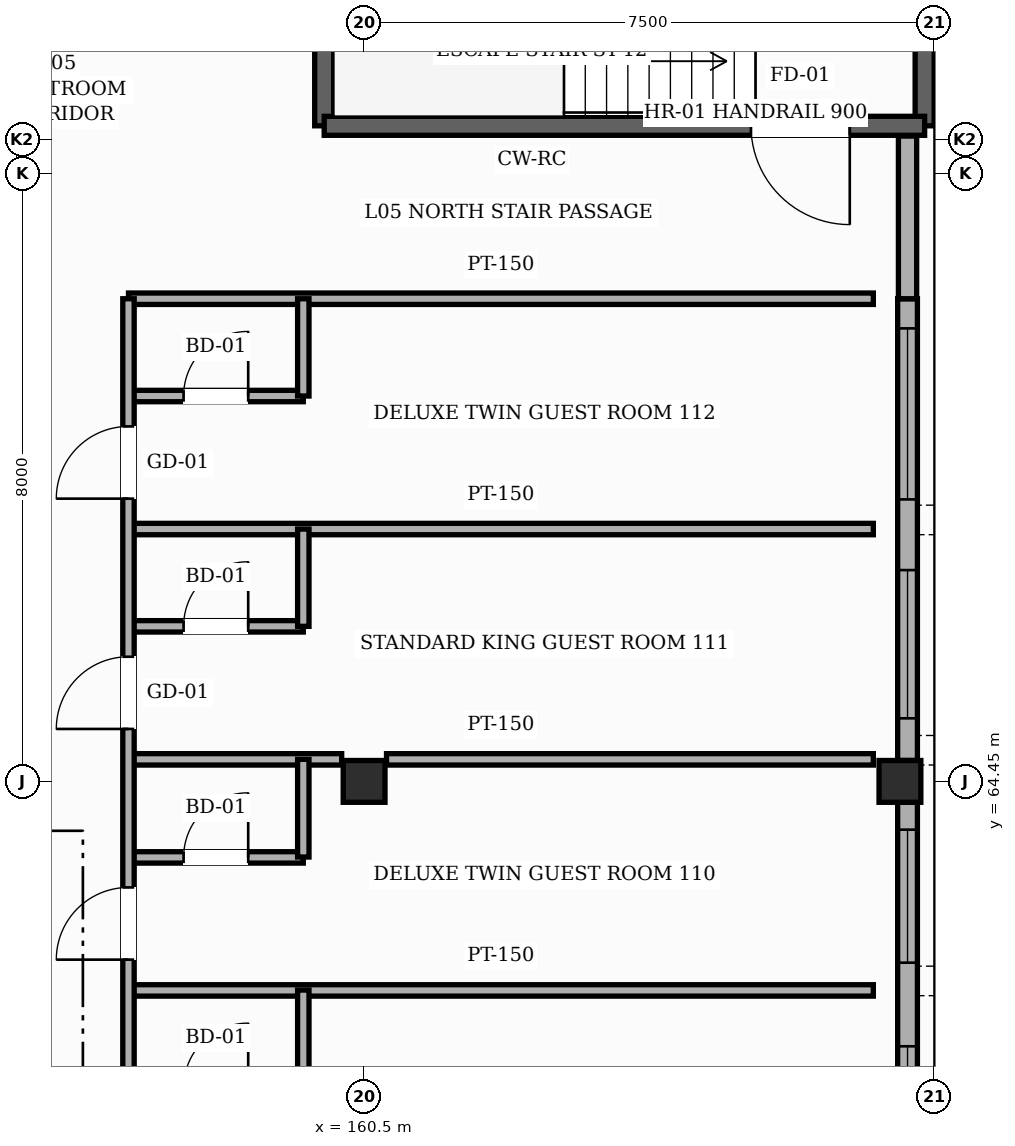
"""IFC4 building model, lengths in metres.
Left out: names, types, materials, properties, quantities, classifications, styles, units other than length and angle.
Written with IfcOpenShell. Run it as: python <this file> out.ifc"""

import sys

from ifc_helpers import new_model, si_unit, direction, frame, frame_2d, origin, origin_2d, place, context, subcontext, project, spatial, rectangle, hollow_rectangle, extrude, element, fill, save


model = new_model("IFC4")
c1 = context("Model", 3, precision=1e-05, world=origin(), true_north=direction((0.0, 1.0)))
c2 = subcontext(c1, "Body", "Model", "MODEL_VIEW")
j1 = project(units=[si_unit("LENGTHUNIT", "METRE"), si_unit("PLANEANGLEUNIT", "RADIAN")], contexts=[c1])
p1 = place(None, origin())
s1 = spatial("IfcSite", under=j1, at=p1, CompositionType="ELEMENT")
p2 = place(p1, origin())
s2 = spatial("IfcBuilding", under=s1, at=p2, CompositionType="ELEMENT")
p3 = place(p2, frame((0.0, 0.0, 24.6)))
s3 = spatial("IfcBuildingStorey", under=s2, at=p3, CompositionType="ELEMENT", Elevation=24.6)
for number, where, z_axis, x_axis in (
    (1, (160.5, 64.45, 0.0), (0.0, 0.0, 1.0), (1.0, 0.0, 0.0)),
    (2, (167.55, 64.45, 0.0), (0.0, 0.0, 1.0), (1.0, 0.0, 0.0)),
):
    element("IfcColumn", number, at=place(p3, frame(where, z_axis=z_axis, x_axis=x_axis)), inside=s3, PredefinedType="COLUMN", context=c2, shape_type="SweptSolid", body=[
        extrude(hollow_rectangle(XDim=0.55, YDim=0.55, WallThickness=0.022, InnerFilletRadius=0.022, OuterFilletRadius=0.044, at=origin_2d()), origin(), (0.0, 0.0, 1.0), 3.6),
    ])
p4 = place(p3, frame((167.65, 64.175, 0.0), z_axis=(0.0, 0.0, 1.0), x_axis=(0.0, -1.0, 0.0)))
e3 = element("IfcWall", 3, at=p4, inside=s3, PredefinedType="SOLIDWALL", context=c2, shape_type="SweptSolid", body=[
    extrude(rectangle(XDim=7.45, YDim=0.26, at=frame_2d((3.725, 0.0))), origin(), (0.0, 0.0, 1.0), 2.755),
])
p5 = place(p4, frame((5.8, 0.0, 0.85)))
e4 = element("IfcOpeningElement", 4, at=p5, cuts=e3, PredefinedType="OPENING", context=c2, shape_type="SweptSolid", body=[
    extrude(rectangle(XDim=1.35, YDim=1.5, at=frame_2d((0.675, 0.75))), frame((0.0, 0.14, 0.0), z_axis=(0.0, -1.0, 0.0), x_axis=(1.0, 0.0, 0.0)), (0.0, 0.0, 1.0), 0.28),
])
p6 = place(p4, frame((3.21, 0.0, 0.85)))
e5 = element("IfcOpeningElement", 5, at=p6, cuts=e3, PredefinedType="OPENING", context=c2, shape_type="SweptSolid", body=[
    extrude(rectangle(XDim=1.55, YDim=1.5, at=frame_2d((0.775, 0.75))), frame((0.0, 0.14, 0.0), z_axis=(0.0, -1.0, 0.0), x_axis=(1.0, 0.0, 0.0)), (0.0, 0.0, 1.0), 0.28),
])
p7 = place(p4, frame((0.36, 0.0, 0.85)))
e6 = element("IfcOpeningElement", 6, at=p7, cuts=e3, PredefinedType="OPENING", context=c2, shape_type="SweptSolid", body=[
    extrude(rectangle(XDim=1.75, YDim=1.5, at=frame_2d((0.875, 0.75))), frame((0.0, 0.14, 0.0), z_axis=(0.0, -1.0, 0.0), x_axis=(1.0, 0.0, 0.0)), (0.0, 0.0, 1.0), 0.28),
])
p8 = place(p3, frame((167.65, 70.8, 0.0), z_axis=(0.0, 0.0, 1.0), x_axis=(0.0, -1.0, 0.0)))
e7 = element("IfcWall", 7, at=p8, inside=s3, PredefinedType="SOLIDWALL", context=c2, shape_type="SweptSolid", body=[
    extrude(rectangle(XDim=6.075, YDim=0.26, at=frame_2d((3.038, 0.0))), origin(), (0.0, 0.0, 1.0), 3.365),
])
p9 = place(p8, frame((3.57, 0.0, 0.85)))
e8 = element("IfcOpeningElement", 8, at=p9, cuts=e7, PredefinedType="OPENING", context=c2, shape_type="SweptSolid", body=[
    extrude(rectangle(XDim=1.95, YDim=1.5, at=frame_2d((0.975, 0.75))), frame((0.0, 0.14, 0.0), z_axis=(0.0, -1.0, 0.0), x_axis=(1.0, 0.0, 0.0)), (0.0, 0.0, 1.0), 0.28),
])
p10 = place(p8, frame((0.39, 0.0, 0.85)))
e9 = element("IfcOpeningElement", 9, at=p10, cuts=e7, PredefinedType="OPENING", context=c2, shape_type="SweptSolid", body=[
    extrude(rectangle(XDim=2.25, YDim=1.5, at=frame_2d((1.125, 0.75))), frame((0.0, 0.14, 0.0), z_axis=(0.0, -1.0, 0.0), x_axis=(1.0, 0.0, 0.0)), (0.0, 0.0, 1.0), 0.28),
])
p11 = place(p3, frame((167.65, 72.94, 0.0), z_axis=(0.0, 0.0, 1.0), x_axis=(0.0, -1.0, 0.0)))
e10 = element("IfcWall", 10, at=p11, inside=s3, PredefinedType="SOLIDWALL", context=c2, shape_type="SweptSolid", body=[
    extrude(rectangle(XDim=2.14, YDim=0.24, at=frame_2d((1.07, 0.0))), origin(), (0.0, 0.0, 1.0), 3.365),
])
for number, where, z_axis, x_axis in (
    (11, (167.875, 76.425, 0.0), (0.0, 0.0, 1.0), (0.0, -1.0, 0.0)),
    (12, (159.975, 73.075, 0.0), (0.0, 0.0, 1.0), (0.0, 1.0, 0.0)),
):
    element("IfcWall", number, at=place(p3, frame(where, z_axis=z_axis, x_axis=x_axis)), inside=s3, PredefinedType="SHEAR", context=c2, shape_type="SweptSolid", body=[
        extrude(rectangle(XDim=3.35, YDim=0.25, at=frame_2d((1.675, 0.0))), origin(), (0.0, 0.0, 1.0), 3.38),
    ])
p12 = place(p3, frame((167.875, 73.075, 0.0), z_axis=(0.0, 0.0, 1.0), x_axis=(-1.0, 0.0, 0.0)))
e13 = element("IfcWall", 13, at=p12, inside=s3, PredefinedType="SHEAR", context=c2, shape_type="SweptSolid", body=[
    extrude(rectangle(XDim=7.9, YDim=0.25, at=frame_2d((3.95, 0.0))), origin(), (0.0, 0.0, 1.0), 3.38),
])
p13 = place(p12, frame((0.985, 0.0, 0.0)))
e14 = element("IfcOpeningElement", 14, at=p13, cuts=e13, PredefinedType="OPENING", context=c2, shape_type="SweptSolid", body=[
    extrude(rectangle(XDim=1.3, YDim=2.2, at=frame_2d((0.65, 1.1))), frame((0.0, 0.135, 0.0), z_axis=(0.0, -1.0, 0.0), x_axis=(1.0, 0.0, 0.0)), (0.0, 0.0, 1.0), 0.27),
])
p14 = place(p3, frame((157.4, 61.7, 0.0), z_axis=(0.0, 0.0, 1.0), x_axis=(1.0, 0.0, 0.0)))
e15 = element("IfcWall", 15, at=p14, inside=s3, PredefinedType="PARTITIONING", context=c2, shape_type="SweptSolid", body=[
    extrude(rectangle(XDim=9.8, YDim=0.15, at=frame_2d((4.9, 0.0))), origin(), (0.0, 0.0, 1.0), 3.365),
])
p15 = place(p3, frame((157.4, 63.45, 0.0), z_axis=(0.0, 0.0, 1.0), x_axis=(1.0, 0.0, 0.0)))
e16 = element("IfcWall", 16, at=p15, inside=s3, PredefinedType="PARTITIONING", context=c2, shape_type="SweptSolid", body=[
    extrude(rectangle(XDim=2.3, YDim=0.15, at=frame_2d((1.15, 0.0))), origin(), (0.0, 0.0, 1.0), 3.365),
])
p16 = place(p15, frame((0.725, 0.0, 0.0)))
e17 = element("IfcOpeningElement", 17, at=p16, cuts=e16, PredefinedType="OPENING", context=c2, shape_type="SweptSolid", body=[
    extrude(rectangle(XDim=0.85, YDim=2.1, at=frame_2d((0.425, 1.05))), frame((0.0, 0.085, 0.0), z_axis=(0.0, -1.0, 0.0), x_axis=(1.0, 0.0, 0.0)), (0.0, 0.0, 1.0), 0.17),
])
p17 = place(p3, frame((157.4, 64.74, 0.0), z_axis=(0.0, 0.0, 1.0), x_axis=(1.0, 0.0, 0.0)))
e18 = element("IfcWall", 18, at=p17, inside=s3, PredefinedType="PARTITIONING", context=c2, shape_type="SweptSolid", body=[
    extrude(rectangle(XDim=2.805, YDim=0.15, at=frame_2d((1.403, 0.0))), origin(), (0.0, 0.0, 1.0), 2.805),
])
p18 = place(p3, frame((160.795, 64.74, 0.0), z_axis=(0.0, 0.0, 1.0), x_axis=(1.0, 0.0, 0.0)))
e19 = element("IfcWall", 19, at=p18, inside=s3, PredefinedType="PARTITIONING", context=c2, shape_type="SweptSolid", body=[
    extrude(rectangle(XDim=6.405, YDim=0.15, at=frame_2d((3.203, 0.0))), origin(), (0.0, 0.0, 1.0), 2.855),
])
p19 = place(p3, frame((157.4, 66.49, 0.0), z_axis=(0.0, 0.0, 1.0), x_axis=(1.0, 0.0, 0.0)))
e20 = element("IfcWall", 20, at=p19, inside=s3, PredefinedType="PARTITIONING", context=c2, shape_type="SweptSolid", body=[
    extrude(rectangle(XDim=2.3, YDim=0.15, at=frame_2d((1.15, 0.0))), origin(), (0.0, 0.0, 1.0), 3.365),
])
p20 = place(p19, frame((0.725, 0.0, 0.0)))
e21 = element("IfcOpeningElement", 21, at=p20, cuts=e20, PredefinedType="OPENING", context=c2, shape_type="SweptSolid", body=[
    extrude(rectangle(XDim=0.85, YDim=2.1, at=frame_2d((0.425, 1.05))), frame((0.0, 0.085, 0.0), z_axis=(0.0, -1.0, 0.0), x_axis=(1.0, 0.0, 0.0)), (0.0, 0.0, 1.0), 0.17),
])
p21 = place(p3, frame((157.4, 67.77, 0.0), z_axis=(0.0, 0.0, 1.0), x_axis=(1.0, 0.0, 0.0)))
e22 = element("IfcWall", 22, at=p21, inside=s3, PredefinedType="PARTITIONING", context=c2, shape_type="SweptSolid", body=[
    extrude(rectangle(XDim=9.8, YDim=0.15, at=frame_2d((4.9, 0.0))), origin(), (0.0, 0.0, 1.0), 3.365),
])
p22 = place(p3, frame((157.4, 69.52, 0.0), z_axis=(0.0, 0.0, 1.0), x_axis=(1.0, 0.0, 0.0)))
e23 = element("IfcWall", 23, at=p22, inside=s3, PredefinedType="PARTITIONING", context=c2, shape_type="SweptSolid", body=[
    extrude(rectangle(XDim=2.3, YDim=0.15, at=frame_2d((1.15, 0.0))), origin(), (0.0, 0.0, 1.0), 3.365),
])
p23 = place(p22, frame((0.725, 0.0, 0.0)))
e24 = element("IfcOpeningElement", 24, at=p23, cuts=e23, PredefinedType="OPENING", context=c2, shape_type="SweptSolid", body=[
    extrude(rectangle(XDim=0.85, YDim=2.1, at=frame_2d((0.425, 1.05))), frame((0.0, 0.085, 0.0), z_axis=(0.0, -1.0, 0.0), x_axis=(1.0, 0.0, 0.0)), (0.0, 0.0, 1.0), 0.17),
])
p24 = place(p3, frame((157.4, 70.8, 0.0), z_axis=(0.0, 0.0, 1.0), x_axis=(1.0, 0.0, 0.0)))
e25 = element("IfcWall", 25, at=p24, inside=s3, PredefinedType="PARTITIONING", context=c2, shape_type="SweptSolid", body=[
    extrude(rectangle(XDim=9.8, YDim=0.15, at=frame_2d((4.9, 0.0))), origin(), (0.0, 0.0, 1.0), 3.365),
])
p25 = place(p3, frame((157.4, 22.3, 0.0), z_axis=(0.0, 0.0, 1.0), x_axis=(0.0, 1.0, 0.0)))
e26 = element("IfcWall", 26, at=p25, inside=s3, PredefinedType="PARTITIONING", context=c2, shape_type="SweptSolid", body=[
    extrude(rectangle(XDim=48.5, YDim=0.15, at=frame_2d((24.25, 0.0))), origin(), (0.0, 0.0, 1.0), 3.365),
])
p26 = place(p25, frame((0.4, 0.0, 0.0)))
e27 = element("IfcOpeningElement", 27, at=p26, cuts=e26, PredefinedType="OPENING", context=c2, shape_type="SweptSolid", body=[
    extrude(rectangle(XDim=0.95, YDim=2.15, at=frame_2d((0.475, 1.075))), frame((0.0, 0.085, 0.0), z_axis=(0.0, -1.0, 0.0), x_axis=(1.0, 0.0, 0.0)), (0.0, 0.0, 1.0), 0.17),
])
p27 = place(p25, frame((3.43, 0.0, 0.0)))
e28 = element("IfcOpeningElement", 28, at=p27, cuts=e26, PredefinedType="OPENING", context=c2, shape_type="SweptSolid", body=[
    extrude(rectangle(XDim=0.95, YDim=2.15, at=frame_2d((0.475, 1.075))), frame((0.0, 0.085, 0.0), z_axis=(0.0, -1.0, 0.0), x_axis=(1.0, 0.0, 0.0)), (0.0, 0.0, 1.0), 0.17),
])
p28 = place(p25, frame((6.46, 0.0, 0.0)))
e29 = element("IfcOpeningElement", 29, at=p28, cuts=e26, PredefinedType="OPENING", context=c2, shape_type="SweptSolid", body=[
    extrude(rectangle(XDim=0.95, YDim=2.15, at=frame_2d((0.475, 1.075))), frame((0.0, 0.085, 0.0), z_axis=(0.0, -1.0, 0.0), x_axis=(1.0, 0.0, 0.0)), (0.0, 0.0, 1.0), 0.17),
])
p29 = place(p25, frame((9.495, 0.0, 0.0)))
e30 = element("IfcOpeningElement", 30, at=p29, cuts=e26, PredefinedType="OPENING", context=c2, shape_type="SweptSolid", body=[
    extrude(rectangle(XDim=0.95, YDim=2.15, at=frame_2d((0.475, 1.075))), frame((0.0, 0.085, 0.0), z_axis=(0.0, -1.0, 0.0), x_axis=(1.0, 0.0, 0.0)), (0.0, 0.0, 1.0), 0.17),
])
p30 = place(p25, frame((12.525, 0.0, 0.0)))
e31 = element("IfcOpeningElement", 31, at=p30, cuts=e26, PredefinedType="OPENING", context=c2, shape_type="SweptSolid", body=[
    extrude(rectangle(XDim=0.95, YDim=2.15, at=frame_2d((0.475, 1.075))), frame((0.0, 0.085, 0.0), z_axis=(0.0, -1.0, 0.0), x_axis=(1.0, 0.0, 0.0)), (0.0, 0.0, 1.0), 0.17),
])
p31 = place(p25, frame((15.555, 0.0, 0.0)))
e32 = element("IfcOpeningElement", 32, at=p31, cuts=e26, PredefinedType="OPENING", context=c2, shape_type="SweptSolid", body=[
    extrude(rectangle(XDim=0.95, YDim=2.15, at=frame_2d((0.475, 1.075))), frame((0.0, 0.085, 0.0), z_axis=(0.0, -1.0, 0.0), x_axis=(1.0, 0.0, 0.0)), (0.0, 0.0, 1.0), 0.17),
])
p32 = place(p25, frame((18.585, 0.0, 0.0)))
e33 = element("IfcOpeningElement", 33, at=p32, cuts=e26, PredefinedType="OPENING", context=c2, shape_type="SweptSolid", body=[
    extrude(rectangle(XDim=0.95, YDim=2.15, at=frame_2d((0.475, 1.075))), frame((0.0, 0.085, 0.0), z_axis=(0.0, -1.0, 0.0), x_axis=(1.0, 0.0, 0.0)), (0.0, 0.0, 1.0), 0.17),
])
p33 = place(p25, frame((21.62, 0.0, 0.0)))
e34 = element("IfcOpeningElement", 34, at=p33, cuts=e26, PredefinedType="OPENING", context=c2, shape_type="SweptSolid", body=[
    extrude(rectangle(XDim=0.95, YDim=2.15, at=frame_2d((0.475, 1.075))), frame((0.0, 0.085, 0.0), z_axis=(0.0, -1.0, 0.0), x_axis=(1.0, 0.0, 0.0)), (0.0, 0.0, 1.0), 0.17),
])
p34 = place(p25, frame((24.65, 0.0, 0.0)))
e35 = element("IfcOpeningElement", 35, at=p34, cuts=e26, PredefinedType="OPENING", context=c2, shape_type="SweptSolid", body=[
    extrude(rectangle(XDim=0.95, YDim=2.15, at=frame_2d((0.475, 1.075))), frame((0.0, 0.085, 0.0), z_axis=(0.0, -1.0, 0.0), x_axis=(1.0, 0.0, 0.0)), (0.0, 0.0, 1.0), 0.17),
])
p35 = place(p25, frame((27.68, 0.0, 0.0)))
e36 = element("IfcOpeningElement", 36, at=p35, cuts=e26, PredefinedType="OPENING", context=c2, shape_type="SweptSolid", body=[
    extrude(rectangle(XDim=0.95, YDim=2.15, at=frame_2d((0.475, 1.075))), frame((0.0, 0.085, 0.0), z_axis=(0.0, -1.0, 0.0), x_axis=(1.0, 0.0, 0.0)), (0.0, 0.0, 1.0), 0.17),
])
p36 = place(p25, frame((30.71, 0.0, 0.0)))
e37 = element("IfcOpeningElement", 37, at=p36, cuts=e26, PredefinedType="OPENING", context=c2, shape_type="SweptSolid", body=[
    extrude(rectangle(XDim=0.95, YDim=2.15, at=frame_2d((0.475, 1.075))), frame((0.0, 0.085, 0.0), z_axis=(0.0, -1.0, 0.0), x_axis=(1.0, 0.0, 0.0)), (0.0, 0.0, 1.0), 0.17),
])
p37 = place(p25, frame((33.745, 0.0, 0.0)))
e38 = element("IfcOpeningElement", 38, at=p37, cuts=e26, PredefinedType="OPENING", context=c2, shape_type="SweptSolid", body=[
    extrude(rectangle(XDim=0.95, YDim=2.15, at=frame_2d((0.475, 1.075))), frame((0.0, 0.085, 0.0), z_axis=(0.0, -1.0, 0.0), x_axis=(1.0, 0.0, 0.0)), (0.0, 0.0, 1.0), 0.17),
])
p38 = place(p25, frame((36.775, 0.0, 0.0)))
e39 = element("IfcOpeningElement", 39, at=p38, cuts=e26, PredefinedType="OPENING", context=c2, shape_type="SweptSolid", body=[
    extrude(rectangle(XDim=0.95, YDim=2.15, at=frame_2d((0.475, 1.075))), frame((0.0, 0.085, 0.0), z_axis=(0.0, -1.0, 0.0), x_axis=(1.0, 0.0, 0.0)), (0.0, 0.0, 1.0), 0.17),
])
p39 = place(p25, frame((39.805, 0.0, 0.0)))
e40 = element("IfcOpeningElement", 40, at=p39, cuts=e26, PredefinedType="OPENING", context=c2, shape_type="SweptSolid", body=[
    extrude(rectangle(XDim=0.95, YDim=2.15, at=frame_2d((0.475, 1.075))), frame((0.0, 0.085, 0.0), z_axis=(0.0, -1.0, 0.0), x_axis=(1.0, 0.0, 0.0)), (0.0, 0.0, 1.0), 0.17),
])
p40 = place(p25, frame((42.84, 0.0, 0.0)))
e41 = element("IfcOpeningElement", 41, at=p40, cuts=e26, PredefinedType="OPENING", context=c2, shape_type="SweptSolid", body=[
    extrude(rectangle(XDim=0.95, YDim=2.15, at=frame_2d((0.475, 1.075))), frame((0.0, 0.085, 0.0), z_axis=(0.0, -1.0, 0.0), x_axis=(1.0, 0.0, 0.0)), (0.0, 0.0, 1.0), 0.17),
])
p41 = place(p25, frame((45.87, 0.0, 0.0)))
e42 = element("IfcOpeningElement", 42, at=p41, cuts=e26, PredefinedType="OPENING", context=c2, shape_type="SweptSolid", body=[
    extrude(rectangle(XDim=0.95, YDim=2.15, at=frame_2d((0.475, 1.075))), frame((0.0, 0.085, 0.0), z_axis=(0.0, -1.0, 0.0), x_axis=(1.0, 0.0, 0.0)), (0.0, 0.0, 1.0), 0.17),
])
p42 = place(p3, frame((159.7, 60.425, 0.0), z_axis=(0.0, 0.0, 1.0), x_axis=(0.0, 1.0, 0.0)))
e43 = element("IfcWall", 43, at=p42, inside=s3, PredefinedType="PARTITIONING", context=c2, shape_type="SweptSolid", body=[
    extrude(rectangle(XDim=1.28, YDim=0.15, at=frame_2d((0.64, 0.0))), origin(), (0.0, 0.0, 1.0), 3.365),
])
p43 = place(p3, frame((159.7, 63.455, 0.0), z_axis=(0.0, 0.0, 1.0), x_axis=(0.0, 1.0, 0.0)))
e44 = element("IfcWall", 44, at=p43, inside=s3, PredefinedType="PARTITIONING", context=c2, shape_type="SweptSolid", body=[
    extrude(rectangle(XDim=1.285, YDim=0.15, at=frame_2d((0.643, 0.0))), origin(), (0.0, 0.0, 1.0), 3.365),
])
for number, where, z_axis, x_axis in (
    (45, (159.7, 66.49, 0.0), (0.0, 0.0, 1.0), (0.0, 1.0, 0.0)),
    (46, (159.7, 69.52, 0.0), (0.0, 0.0, 1.0), (0.0, 1.0, 0.0)),
):
    element("IfcWall", number, at=place(p3, frame(where, z_axis=z_axis, x_axis=x_axis)), inside=s3, PredefinedType="PARTITIONING", context=c2, shape_type="SweptSolid", body=[
        extrude(rectangle(XDim=1.28, YDim=0.15, at=frame_2d((0.64, 0.0))), origin(), (0.0, 0.0, 1.0), 3.365),
    ])
p44 = place(p6, origin())
e47 = element("IfcWindow", 47, at=p44, inside=s3, PartitioningType="SINGLE_PANEL", PredefinedType="WINDOW", context=c2, shape_type="SweptSolid", body=[
    extrude(rectangle(XDim=1.55, YDim=1.5, at=frame_2d((0.775, 0.75))), frame((0.0, 0.03, 0.0), z_axis=(0.0, -1.0, 0.0), x_axis=(1.0, 0.0, 0.0)), (0.0, 0.0, 1.0), 0.06),
])
fill(e5, e47)
p45 = place(p7, origin())
e48 = element("IfcWindow", 48, at=p45, inside=s3, PartitioningType="SINGLE_PANEL", PredefinedType="WINDOW", context=c2, shape_type="SweptSolid", body=[
    extrude(rectangle(XDim=1.75, YDim=1.5, at=frame_2d((0.875, 0.75))), frame((0.0, 0.03, 0.0), z_axis=(0.0, -1.0, 0.0), x_axis=(1.0, 0.0, 0.0)), (0.0, 0.0, 1.0), 0.06),
])
fill(e6, e48)
p46 = place(p9, origin())
e49 = element("IfcWindow", 49, at=p46, inside=s3, PartitioningType="SINGLE_PANEL", PredefinedType="WINDOW", context=c2, shape_type="SweptSolid", body=[
    extrude(rectangle(XDim=1.95, YDim=1.5, at=frame_2d((0.975, 0.75))), frame((0.0, 0.03, 0.0), z_axis=(0.0, -1.0, 0.0), x_axis=(1.0, 0.0, 0.0)), (0.0, 0.0, 1.0), 0.06),
])
fill(e8, e49)
p47 = place(p10, origin())
e50 = element("IfcWindow", 50, at=p47, inside=s3, PartitioningType="SINGLE_PANEL", PredefinedType="WINDOW", context=c2, shape_type="SweptSolid", body=[
    extrude(rectangle(XDim=2.25, YDim=1.5, at=frame_2d((1.125, 0.75))), frame((0.0, 0.03, 0.0), z_axis=(0.0, -1.0, 0.0), x_axis=(1.0, 0.0, 0.0)), (0.0, 0.0, 1.0), 0.06),
])
fill(e9, e50)
p48 = place(p13, origin())
e51 = element("IfcDoor", 51, at=p48, inside=s3, OperationType="SINGLE_SWING_LEFT", PredefinedType="DOOR", context=c2, shape_type="SweptSolid", body=[
    extrude(rectangle(XDim=1.3, YDim=2.2, at=frame_2d((0.65, 1.1))), frame((0.0, 0.025, 0.0), z_axis=(0.0, -1.0, 0.0), x_axis=(1.0, 0.0, 0.0)), (0.0, 0.0, 1.0), 0.05),
])
fill(e14, e51)
p49 = place(p39, origin())
e52 = element("IfcDoor", 52, at=p49, inside=s3, OperationType="SINGLE_SWING_LEFT", PredefinedType="DOOR", context=c2, shape_type="SweptSolid", body=[
    extrude(rectangle(XDim=0.95, YDim=2.15, at=frame_2d((0.475, 1.075))), frame((0.0, 0.025, 0.0), z_axis=(0.0, -1.0, 0.0), x_axis=(1.0, 0.0, 0.0)), (0.0, 0.0, 1.0), 0.05),
])
fill(e40, e52)
p50 = place(p16, origin())
e53 = element("IfcDoor", 53, at=p50, inside=s3, OperationType="SINGLE_SWING_RIGHT", PredefinedType="DOOR", context=c2, shape_type="SweptSolid", body=[
    extrude(rectangle(XDim=0.85, YDim=2.1, at=frame_2d((0.425, 1.05))), frame((0.0, 0.025, 0.0), z_axis=(0.0, -1.0, 0.0), x_axis=(1.0, 0.0, 0.0)), (0.0, 0.0, 1.0), 0.05),
])
fill(e17, e53)
p51 = place(p40, origin())
e54 = element("IfcDoor", 54, at=p51, inside=s3, OperationType="SINGLE_SWING_LEFT", PredefinedType="DOOR", context=c2, shape_type="SweptSolid", body=[
    extrude(rectangle(XDim=0.95, YDim=2.15, at=frame_2d((0.475, 1.075))), frame((0.0, 0.025, 0.0), z_axis=(0.0, -1.0, 0.0), x_axis=(1.0, 0.0, 0.0)), (0.0, 0.0, 1.0), 0.05),
])
fill(e41, e54)
p52 = place(p20, origin())
e55 = element("IfcDoor", 55, at=p52, inside=s3, OperationType="SINGLE_SWING_RIGHT", PredefinedType="DOOR", context=c2, shape_type="SweptSolid", body=[
    extrude(rectangle(XDim=0.85, YDim=2.1, at=frame_2d((0.425, 1.05))), frame((0.0, 0.025, 0.0), z_axis=(0.0, -1.0, 0.0), x_axis=(1.0, 0.0, 0.0)), (0.0, 0.0, 1.0), 0.05),
])
fill(e21, e55)
p53 = place(p41, origin())
e56 = element("IfcDoor", 56, at=p53, inside=s3, OperationType="SINGLE_SWING_LEFT", PredefinedType="DOOR", context=c2, shape_type="SweptSolid", body=[
    extrude(rectangle(XDim=0.95, YDim=2.15, at=frame_2d((0.475, 1.075))), frame((0.0, 0.025, 0.0), z_axis=(0.0, -1.0, 0.0), x_axis=(1.0, 0.0, 0.0)), (0.0, 0.0, 1.0), 0.05),
])
fill(e42, e56)
p54 = place(p23, origin())
e57 = element("IfcDoor", 57, at=p54, inside=s3, OperationType="SINGLE_SWING_RIGHT", PredefinedType="DOOR", context=c2, shape_type="SweptSolid", body=[
    extrude(rectangle(XDim=0.85, YDim=2.1, at=frame_2d((0.425, 1.05))), frame((0.0, 0.025, 0.0), z_axis=(0.0, -1.0, 0.0), x_axis=(1.0, 0.0, 0.0)), (0.0, 0.0, 1.0), 0.05),
])
fill(e24, e57)
save(model, sys.argv[1])
